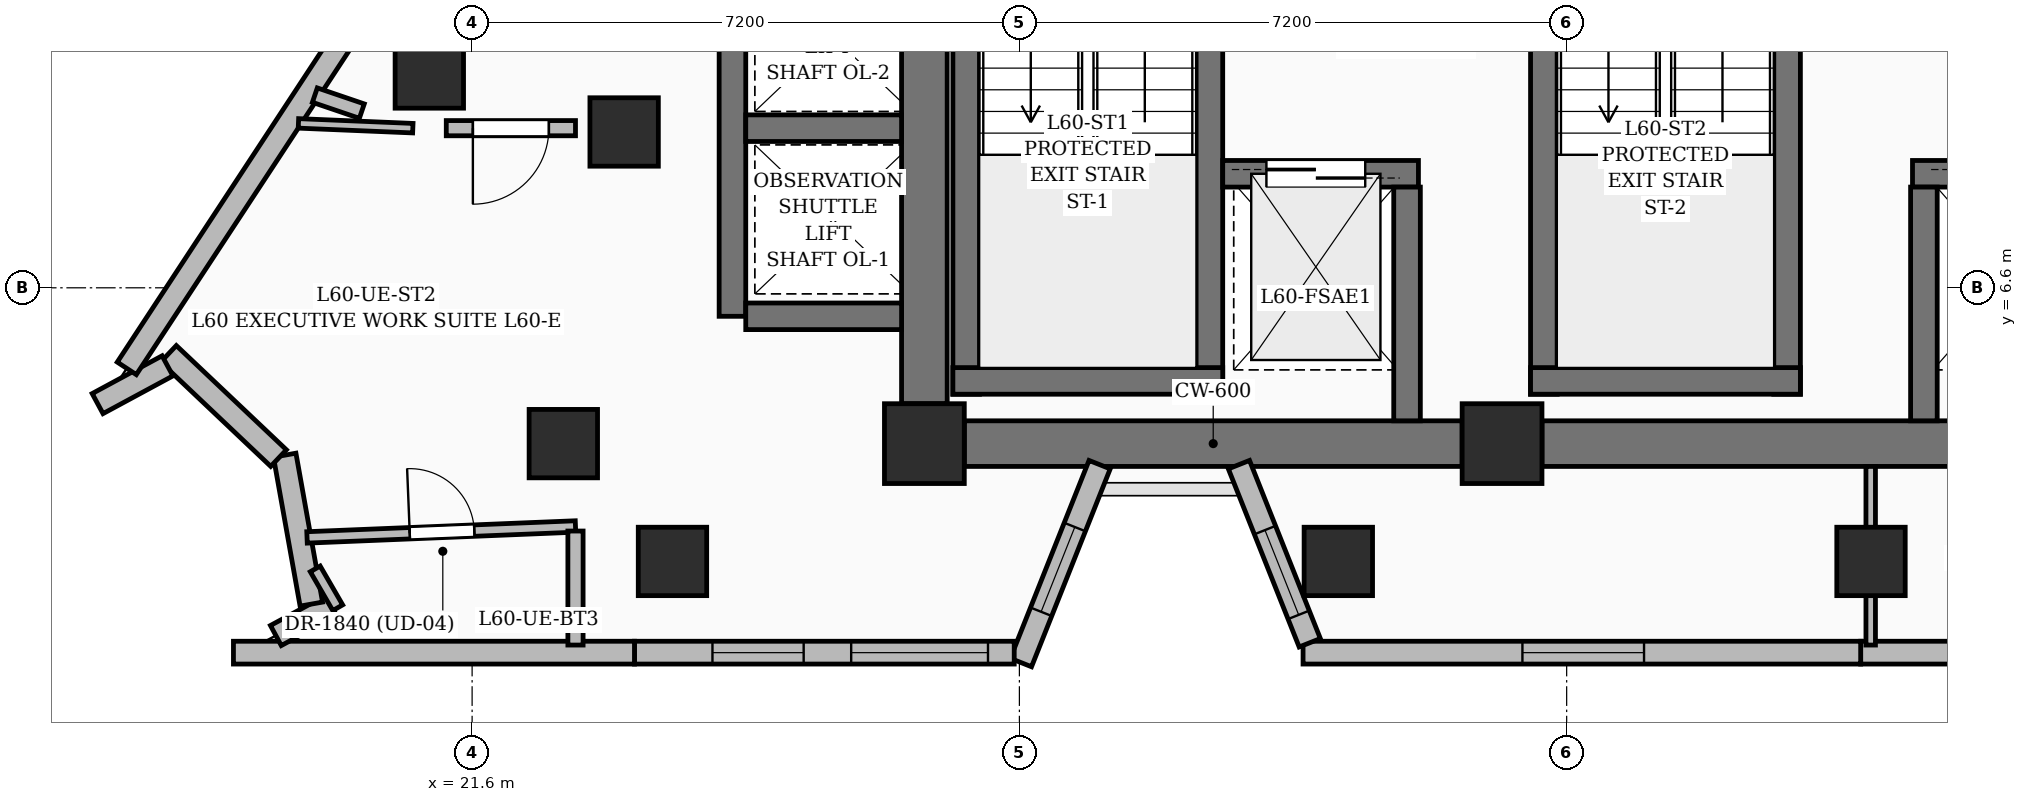
"""IFC4 building model, lengths in metres.
Left out: names, types, materials, properties, quantities, classifications, styles, units other than length and angle.
Written with IfcOpenShell. Run it as: python <this file> out.ifc"""

import sys

from ifc_helpers import new_model, si_unit, direction, frame, frame_2d, origin, origin_2d, place, context, subcontext, project, spatial, rectangle, extrude, element, fill, save


model = new_model("IFC4")
c1 = context("Model", 3, precision=1e-05, world=origin(), true_north=direction((0.0, 1.0)))
c2 = subcontext(c1, "Body", "Model", "MODEL_VIEW")
j1 = project(units=[si_unit("LENGTHUNIT", "METRE"), si_unit("PLANEANGLEUNIT", "RADIAN")], contexts=[c1])
p1 = place(None, origin())
s1 = spatial("IfcSite", under=j1, at=p1, CompositionType="ELEMENT")
p2 = place(p1, origin())
s2 = spatial("IfcBuilding", under=s1, at=p2, CompositionType="ELEMENT")
p3 = place(p2, frame((0.0, 0.0, 233.25)))
s3 = spatial("IfcBuildingStorey", under=s2, at=p3, CompositionType="ELEMENT", Elevation=233.25)
for number, where, z_axis, x_axis in (
    (1, (27.55, 4.55, 0.0), (0.0, 0.0, 1.0), (1.0, 0.0, 0.0)),
    (2, (35.15, 4.55, 0.0), (0.0, 0.0, 1.0), (1.0, 0.0, 0.0)),
):
    element("IfcColumn", number, at=place(p3, frame(where, z_axis=z_axis, x_axis=x_axis)), inside=s3, PredefinedType="COLUMN", context=c2, shape_type="SweptSolid", body=[
        extrude(rectangle(XDim=1.05, YDim=1.05, at=origin_2d()), origin(), (0.0, 0.0, 1.0), 3.75),
    ])
for number, where, z_axis, x_axis in (
    (3, (22.8, 4.55, 0.0), (0.0, 0.0, 1.0), (1.0, 0.0, 0.0)),
    (4, (23.6, 8.65, 0.0), (0.0, 0.0, 1.0), (1.0, 0.0, 0.0)),
):
    element("IfcColumn", number, at=place(p3, frame(where, z_axis=z_axis, x_axis=x_axis)), inside=s3, PredefinedType="COLUMN", context=c2, shape_type="SweptSolid", body=[
        extrude(rectangle(XDim=0.9, YDim=0.9, at=origin_2d()), origin(), (0.0, 0.0, 1.0), 3.75),
    ])
p4 = place(p3, frame((28.075, 4.55, 0.0), z_axis=(0.0, 0.0, 1.0), x_axis=(1.0, 0.0, 0.0)))
e5 = element("IfcWall", 5, at=p4, inside=s3, PredefinedType="SHEAR", context=c2, shape_type="SweptSolid", body=[
    extrude(rectangle(XDim=6.55, YDim=0.6, at=frame_2d((3.275, 0.0))), origin(), (0.0, 0.0, 1.0), 3.75),
])
p5 = place(p3, frame((35.675, 4.55, 0.0), z_axis=(0.0, 0.0, 1.0), x_axis=(1.0, 0.0, 0.0)))
e6 = element("IfcWall", 6, at=p5, inside=s3, PredefinedType="SHEAR", context=c2, shape_type="SweptSolid", body=[
    extrude(rectangle(XDim=10.85, YDim=0.6, at=frame_2d((5.425, 0.0))), origin(), (0.0, 0.0, 1.0), 3.75),
])
p6 = place(p3, frame((27.55, 5.075, 0.0), z_axis=(0.0, 0.0, 1.0), x_axis=(0.0, 1.0, 0.0)))
e7 = element("IfcWall", 7, at=p6, inside=s3, PredefinedType="SHEAR", context=c2, shape_type="SweptSolid", body=[
    extrude(rectangle(XDim=9.15, YDim=0.6, at=frame_2d((4.575, 0.0))), origin(), (0.0, 0.0, 1.0), 3.75),
])
p7 = place(p3, frame((28.1, 5.2, 0.0), z_axis=(0.0, 0.0, 1.0), x_axis=(0.0, 1.0, 0.0)))
e8 = element("IfcWall", 8, at=p7, inside=s3, PredefinedType="SOLIDWALL", context=c2, shape_type="SweptSolid", body=[
    extrude(rectangle(XDim=9.25, YDim=0.35, at=frame_2d((4.625, 0.0))), origin(), (0.0, 0.0, 1.0), 3.75),
])
p8 = place(p3, frame((31.3, 5.2, 0.0), z_axis=(0.0, 0.0, 1.0), x_axis=(0.0, 1.0, 0.0)))
e9 = element("IfcWall", 9, at=p8, inside=s3, PredefinedType="SOLIDWALL", context=c2, shape_type="SweptSolid", body=[
    extrude(rectangle(XDim=9.25, YDim=0.35, at=frame_2d((4.625, 0.0))), origin(), (0.0, 0.0, 1.0), 3.75),
])
p9 = place(p8, frame((6.02, 0.0, 0.0)))
e10 = element("IfcOpeningElement", 10, at=p9, cuts=e9, PredefinedType="OPENING", context=c2, shape_type="SweptSolid", body=[
    extrude(rectangle(XDim=1.0, YDim=2.15, at=frame_2d((0.5, 1.075))), frame((0.0, 0.185, 0.0), z_axis=(0.0, -1.0, 0.0), x_axis=(1.0, 0.0, 0.0)), (0.0, 0.0, 1.0), 0.37),
])
p10 = place(p3, frame((27.925, 5.375, 0.0), z_axis=(0.0, 0.0, 1.0), x_axis=(1.0, 0.0, 0.0)))
e11 = element("IfcWall", 11, at=p10, inside=s3, PredefinedType="SOLIDWALL", context=c2, shape_type="SweptSolid", body=[
    extrude(rectangle(XDim=3.55, YDim=0.35, at=frame_2d((1.775, 0.0))), origin(), (0.0, 0.0, 1.0), 3.75),
])
p11 = place(p3, frame((35.7, 5.2, 0.0), z_axis=(0.0, 0.0, 1.0), x_axis=(0.0, 1.0, 0.0)))
e12 = element("IfcWall", 12, at=p11, inside=s3, PredefinedType="SOLIDWALL", context=c2, shape_type="SweptSolid", body=[
    extrude(rectangle(XDim=9.25, YDim=0.35, at=frame_2d((4.625, 0.0))), origin(), (0.0, 0.0, 1.0), 3.75),
])
p12 = place(p11, frame((6.02, 0.0, 0.0)))
e13 = element("IfcOpeningElement", 13, at=p12, cuts=e12, PredefinedType="OPENING", context=c2, shape_type="SweptSolid", body=[
    extrude(rectangle(XDim=1.0, YDim=2.15, at=frame_2d((0.5, 1.075))), frame((0.0, 0.185, 0.0), z_axis=(0.0, -1.0, 0.0), x_axis=(1.0, 0.0, 0.0)), (0.0, 0.0, 1.0), 0.37),
])
p13 = place(p3, frame((38.9, 5.2, 0.0), z_axis=(0.0, 0.0, 1.0), x_axis=(0.0, 1.0, 0.0)))
e14 = element("IfcWall", 14, at=p13, inside=s3, PredefinedType="SOLIDWALL", context=c2, shape_type="SweptSolid", body=[
    extrude(rectangle(XDim=9.25, YDim=0.35, at=frame_2d((4.625, 0.0))), origin(), (0.0, 0.0, 1.0), 3.75),
])
p14 = place(p13, frame((6.02, 0.0, 0.0)))
e15 = element("IfcOpeningElement", 15, at=p14, cuts=e14, PredefinedType="OPENING", context=c2, shape_type="SweptSolid", body=[
    extrude(rectangle(XDim=1.0, YDim=2.15, at=frame_2d((0.5, 1.075))), frame((0.0, 0.185, 0.0), z_axis=(0.0, -1.0, 0.0), x_axis=(1.0, 0.0, 0.0)), (0.0, 0.0, 1.0), 0.37),
])
p15 = place(p3, frame((35.525, 5.375, 0.0), z_axis=(0.0, 0.0, 1.0), x_axis=(1.0, 0.0, 0.0)))
e16 = element("IfcWall", 16, at=p15, inside=s3, PredefinedType="SOLIDWALL", context=c2, shape_type="SweptSolid", body=[
    extrude(rectangle(XDim=3.55, YDim=0.35, at=frame_2d((1.775, 0.0))), origin(), (0.0, 0.0, 1.0), 3.75),
])
p16 = place(p3, frame((31.475, 8.1, 0.0), z_axis=(0.0, 0.0, 1.0), x_axis=(1.0, 0.0, 0.0)))
e17 = element("IfcWall", 17, at=p16, inside=s3, PredefinedType="SOLIDWALL", context=c2, shape_type="SweptSolid", body=[
    extrude(rectangle(XDim=2.575, YDim=0.35, at=frame_2d((1.288, 0.0))), origin(), (0.0, 0.0, 1.0), 3.75),
])
p17 = place(p16, frame((0.575, 0.0, 0.0)))
e18 = element("IfcOpeningElement", 18, at=p17, cuts=e17, PredefinedType="OPENING", context=c2, shape_type="SweptSolid", body=[
    extrude(rectangle(XDim=1.3, YDim=2.25, at=frame_2d((0.65, 1.125))), frame((0.0, 0.185, 0.0), z_axis=(0.0, -1.0, 0.0), x_axis=(1.0, 0.0, 0.0)), (0.0, 0.0, 1.0), 0.37),
])
p18 = place(p3, frame((40.55, 8.1, 0.0), z_axis=(0.0, 0.0, 1.0), x_axis=(1.0, 0.0, 0.0)))
e19 = element("IfcWall", 19, at=p18, inside=s3, PredefinedType="SOLIDWALL", context=c2, shape_type="SweptSolid", body=[
    extrude(rectangle(XDim=2.575, YDim=0.35, at=frame_2d((1.288, 0.0))), origin(), (0.0, 0.0, 1.0), 3.75),
])
p19 = place(p18, frame((0.7, 0.0, 0.0)))
e20 = element("IfcOpeningElement", 20, at=p19, cuts=e19, PredefinedType="OPENING", context=c2, shape_type="SweptSolid", body=[
    extrude(rectangle(XDim=1.3, YDim=2.25, at=frame_2d((0.65, 1.125))), frame((0.0, 0.185, 0.0), z_axis=(0.0, -1.0, 0.0), x_axis=(1.0, 0.0, 0.0)), (0.0, 0.0, 1.0), 0.37),
])
for number, where, z_axis, x_axis in (
    (21, (33.9, 4.85, 0.0), (0.0, 0.0, 1.0), (0.0, 1.0, 0.0)),
    (22, (40.7, 4.85, 0.0), (0.0, 0.0, 1.0), (0.0, 1.0, 0.0)),
):
    element("IfcWall", number, at=place(p3, frame(where, z_axis=z_axis, x_axis=x_axis)), inside=s3, PredefinedType="SOLIDWALL", context=c2, shape_type="SweptSolid", body=[
        extrude(rectangle(XDim=3.075, YDim=0.35, at=frame_2d((1.538, 0.0))), origin(), (0.0, 0.0, 1.0), 3.75),
    ])
p20 = place(p3, frame((25.025, 6.225, 0.0), z_axis=(0.0, 0.0, 1.0), x_axis=(0.0, 1.0, 0.0)))
e23 = element("IfcWall", 23, at=p20, inside=s3, PredefinedType="SOLIDWALL", context=c2, shape_type="SweptSolid", body=[
    extrude(rectangle(XDim=4.95, YDim=0.35, at=frame_2d((2.475, 0.0))), origin(), (0.0, 0.0, 1.0), 3.75),
])
for number, where, z_axis, x_axis in (
    (24, (25.2, 6.225, 0.0), (0.0, 0.0, 1.0), (1.0, 0.0, 0.0)),
    (25, (25.2, 8.7, 0.0), (0.0, 0.0, 1.0), (1.0, 0.0, 0.0)),
):
    element("IfcWall", number, at=place(p3, frame(where, z_axis=z_axis, x_axis=x_axis)), inside=s3, PredefinedType="SOLIDWALL", context=c2, shape_type="SweptSolid", body=[
        extrude(rectangle(XDim=2.05, YDim=0.35, at=frame_2d((1.025, 0.0))), origin(), (0.0, 0.0, 1.0), 3.75),
    ])
for number, where, z_axis, x_axis in (
    (26, (24.236, 3.0, 0.0), (0.0, 0.0, 1.0), (1.0, 0.0, 0.0)),
    (27, (32.996, 3.0, 0.0), (0.0, 0.0, 1.0), (1.0, 0.0, 0.0)),
    (28, (40.004, 3.0, 0.0), (0.0, 0.0, 1.0), (1.0, 0.0, 0.0)),
    (29, (21.037, 9.413, 0.0), (0.0, 0.0, 1.0), (1.0, 0.0, 0.0)),
):
    element("IfcColumn", number, at=place(p3, frame(where, z_axis=z_axis, x_axis=x_axis)), inside=s3, PredefinedType="COLUMN", context=c2, shape_type="SweptSolid", body=[
        extrude(rectangle(XDim=0.9, YDim=0.9, at=origin_2d()), origin(), (0.0, 0.0, 1.0), 3.75),
    ])
p21 = place(p3, frame((47.204, 1.8, 0.0), z_axis=(0.0, 0.0, 1.0), x_axis=(-1.0, 0.0, 0.0)))
e30 = element("IfcWall", 30, at=p21, inside=s3, PredefinedType="SOLIDWALL", context=c2, shape_type="SweptSolid", body=[
    extrude(rectangle(XDim=7.336, YDim=0.3, at=frame_2d((3.668, 0.0))), origin(), (0.0, 0.0, 1.0), 3.5),
])
p22 = place(p21, frame((2.875, 0.0, 0.6)))
e31 = element("IfcOpeningElement", 31, at=p22, cuts=e30, PredefinedType="OPENING", context=c2, shape_type="SweptSolid", body=[
    extrude(rectangle(XDim=1.8, YDim=2.1, at=frame_2d((0.9, 1.05))), frame((0.0, 0.16, 0.0), z_axis=(0.0, -1.0, 0.0), x_axis=(1.0, 0.0, 0.0)), (0.0, 0.0, 1.0), 0.32),
])
p23 = place(p3, frame((39.868, 1.8, 0.0), z_axis=(0.0, 0.0, 1.0), x_axis=(-1.0, 0.0, 0.0)))
e32 = element("IfcWall", 32, at=p23, inside=s3, PredefinedType="SOLIDWALL", context=c2, shape_type="SweptSolid", body=[
    extrude(rectangle(XDim=7.336, YDim=0.3, at=frame_2d((3.668, 0.0))), origin(), (0.0, 0.0, 1.0), 3.5),
])
p24 = place(p23, frame((2.85, 0.0, 0.55)))
e33 = element("IfcOpeningElement", 33, at=p24, cuts=e32, PredefinedType="OPENING", context=c2, shape_type="SweptSolid", body=[
    extrude(rectangle(XDim=1.6, YDim=2.2, at=frame_2d((0.8, 1.1))), frame((0.0, 0.16, 0.0), z_axis=(0.0, -1.0, 0.0), x_axis=(1.0, 0.0, 0.0)), (0.0, 0.0, 1.0), 0.32),
])
p25 = place(p3, frame((32.62, 1.93, 0.0), z_axis=(0.0, 0.0, 1.0), x_axis=(-0.369453529453, 0.929249207465, 0.0)))
e34 = element("IfcWall", 34, at=p25, inside=s3, PredefinedType="SOLIDWALL", context=c2, shape_type="SweptSolid", body=[
    extrude(rectangle(XDim=2.522, YDim=0.3, at=frame_2d((1.261, 0.0))), origin(), (0.0, 0.0, 1.0), 2.825),
])
p26 = place(p25, frame((0.395, 0.0, 0.8)))
e35 = element("IfcOpeningElement", 35, at=p26, cuts=e34, PredefinedType="OPENING", context=c2, shape_type="SweptSolid", body=[
    extrude(rectangle(XDim=1.2, YDim=1.8, at=frame_2d((0.6, 0.9))), frame((0.0, 0.16, 0.0), z_axis=(0.0, -1.0, 0.0), x_axis=(1.0, 0.0, 0.0)), (0.0, 0.0, 1.0), 0.32),
])
p27 = place(p3, frame((29.856, 4.273, 0.0), z_axis=(0.0, 0.0, 1.0), x_axis=(-0.369542065233, -0.929214002275, 0.0)))
e36 = element("IfcWall", 36, at=p27, inside=s3, PredefinedType="SOLIDWALL", context=c2, shape_type="SweptSolid", body=[
    extrude(rectangle(XDim=2.802, YDim=0.3, at=frame_2d((1.401, 0.0))), origin(), (0.0, 0.0, 1.0), 2.825),
])
p28 = place(p27, frame((0.883, 0.0, 0.8)))
e37 = element("IfcOpeningElement", 37, at=p28, cuts=e36, PredefinedType="OPENING", context=c2, shape_type="SweptSolid", body=[
    extrude(rectangle(XDim=1.2, YDim=1.8, at=frame_2d((0.6, 0.9))), frame((0.0, 0.16, 0.0), z_axis=(0.0, -1.0, 0.0), x_axis=(1.0, 0.0, 0.0)), (0.0, 0.0, 1.0), 0.32),
])
p29 = place(p3, frame((28.732, 1.8, 0.0), z_axis=(0.0, 0.0, 1.0), x_axis=(-1.0, 0.0, 0.0)))
e38 = element("IfcWall", 38, at=p29, inside=s3, PredefinedType="SOLIDWALL", context=c2, shape_type="SweptSolid", body=[
    extrude(rectangle(XDim=4.996, YDim=0.3, at=frame_2d((2.498, 0.0))), origin(), (0.0, 0.0, 1.0), 3.5),
])
p30 = place(p29, frame((0.345, 0.0, 0.6)))
e39 = element("IfcOpeningElement", 39, at=p30, cuts=e38, PredefinedType="OPENING", context=c2, shape_type="SweptSolid", body=[
    extrude(rectangle(XDim=1.8, YDim=2.1, at=frame_2d((0.9, 1.05))), frame((0.0, 0.16, 0.0), z_axis=(0.0, -1.0, 0.0), x_axis=(1.0, 0.0, 0.0)), (0.0, 0.0, 1.0), 0.32),
])
p31 = place(p29, frame((2.77, 0.0, 0.8)))
e40 = element("IfcOpeningElement", 40, at=p31, cuts=e38, PredefinedType="OPENING", context=c2, shape_type="SweptSolid", body=[
    extrude(rectangle(XDim=1.2, YDim=1.8, at=frame_2d((0.6, 0.9))), frame((0.0, 0.16, 0.0), z_axis=(0.0, -1.0, 0.0), x_axis=(1.0, 0.0, 0.0)), (0.0, 0.0, 1.0), 0.32),
])
p32 = place(p3, frame((23.736, 1.8, 0.0), z_axis=(0.0, 0.0, 1.0), x_axis=(-1.0, 0.0, 0.0)))
e41 = element("IfcWall", 41, at=p32, inside=s3, PredefinedType="SOLIDWALL", context=c2, shape_type="SweptSolid", body=[
    extrude(rectangle(XDim=5.276, YDim=0.3, at=frame_2d((2.638, 0.0))), origin(), (0.0, 0.0, 1.0), 3.5),
])
p33 = place(p3, frame((19.018, 2.025, 0.0), z_axis=(0.0, 0.0, 1.0), x_axis=(0.880196276444, 0.474609855496, 0.0)))
e42 = element("IfcWall", 42, at=p33, inside=s3, PredefinedType="SOLIDWALL", context=c2, shape_type="SweptSolid", body=[
    extrude(rectangle(XDim=0.828, YDim=0.3, at=frame_2d((0.414, 0.0))), origin(), (0.0, 0.0, 1.0), 3.5),
])
p34 = place(p3, frame((19.485, 2.439, 0.0), z_axis=(0.0, 0.0, 1.0), x_axis=(-0.175926512458, 0.984403302623, 0.0)))
e43 = element("IfcWall", 43, at=p34, inside=s3, PredefinedType="SOLIDWALL", context=c2, shape_type="SweptSolid", body=[
    extrude(rectangle(XDim=1.99, YDim=0.3, at=frame_2d((0.995, 0.0))), origin(), (0.0, 0.0, 1.0), 3.5),
])
p35 = place(p3, frame((19.054, 4.36, 0.0), z_axis=(0.0, 0.0, 1.0), x_axis=(-0.726119894398, 0.68756810496, 0.0)))
e44 = element("IfcWall", 44, at=p35, inside=s3, PredefinedType="SOLIDWALL", context=c2, shape_type="SweptSolid", body=[
    extrude(rectangle(XDim=1.995, YDim=0.3, at=frame_2d((0.998, 0.0))), origin(), (0.0, 0.0, 1.0), 3.5),
])
p36 = place(p3, frame((17.593, 5.573, 0.0), z_axis=(0.0, 0.0, 1.0), x_axis=(-0.879825313212, -0.475297189378, 0.0)))
e45 = element("IfcWall", 45, at=p36, inside=s3, PredefinedType="SOLIDWALL", context=c2, shape_type="SweptSolid", body=[
    extrude(rectangle(XDim=1.045, YDim=0.3, at=frame_2d((0.523, 0.0))), origin(), (0.0, 0.0, 1.0), 3.5),
])
p37 = place(p3, frame((17.057, 5.54, 0.0), z_axis=(0.0, 0.0, 1.0), x_axis=(0.549039031033, 0.83579671117, 0.0)))
e46 = element("IfcWall", 46, at=p37, inside=s3, PredefinedType="SOLIDWALL", context=c2, shape_type="SweptSolid", body=[
    extrude(rectangle(XDim=6.982, YDim=0.3, at=frame_2d((3.491, 0.0))), origin(), (0.0, 0.0, 1.0), 3.5),
])
p38 = place(p3, frame((19.428, 3.316, 0.0), z_axis=(0.0, 0.0, 1.0), x_axis=(0.999169430966, 0.040748597793, 0.0)))
e47 = element("IfcWall", 47, at=p38, inside=s3, PredefinedType="PARTITIONING", context=c2, shape_type="SweptSolid", body=[
    extrude(rectangle(XDim=3.535, YDim=0.15, at=frame_2d((1.768, 0.0))), origin(), (0.0, 0.0, 1.0), 3.5),
])
p39 = place(p38, frame((1.353, 0.0, 0.0)))
e48 = element("IfcOpeningElement", 48, at=p39, cuts=e47, PredefinedType="OPENING", context=c2, shape_type="SweptSolid", body=[
    extrude(rectangle(XDim=0.85, YDim=2.1, at=frame_2d((0.425, 1.05))), frame((0.0, 0.085, 0.0), z_axis=(0.0, -1.0, 0.0), x_axis=(1.0, 0.0, 0.0)), (0.0, 0.0, 1.0), 0.17),
])
p40 = place(p3, frame((20.149, 8.925, 0.0), z_axis=(0.0, 0.0, 1.0), x_axis=(-0.946606200233, 0.322392155117, 0.0)))
e49 = element("IfcWall", 49, at=p40, inside=s3, PredefinedType="PARTITIONING", context=c2, shape_type="SweptSolid", body=[
    extrude(rectangle(XDim=0.653, YDim=0.2, at=frame_2d((0.326, 0.0))), origin(), (0.0, 0.0, 1.0), 3.5),
])
p41 = place(p3, frame((22.96, 8.7, 0.0), z_axis=(0.0, 0.0, 1.0), x_axis=(-1.0, 0.0, 0.0)))
e50 = element("IfcWall", 50, at=p41, inside=s3, PredefinedType="PARTITIONING", context=c2, shape_type="SweptSolid", body=[
    extrude(rectangle(XDim=1.7, YDim=0.2, at=frame_2d((0.85, 0.0))), origin(), (0.0, 0.0, 1.0), 2.685),
])
p42 = place(p41, frame((0.35, 0.0, 0.0)))
e51 = element("IfcOpeningElement", 51, at=p42, cuts=e50, PredefinedType="OPENING", context=c2, shape_type="SweptSolid", body=[
    extrude(rectangle(XDim=1.0, YDim=2.2, at=frame_2d((0.5, 1.1))), frame((0.0, 0.11, 0.0), z_axis=(0.0, -1.0, 0.0), x_axis=(1.0, 0.0, 0.0)), (0.0, 0.0, 1.0), 0.22),
])
p43 = place(p3, frame((22.96, 1.9, 0.0), z_axis=(0.0, 0.0, 1.0), x_axis=(0.0, 1.0, 0.0)))
e52 = element("IfcWall", 52, at=p43, inside=s3, PredefinedType="PARTITIONING", context=c2, shape_type="SweptSolid", body=[
    extrude(rectangle(XDim=1.5, YDim=0.2, at=frame_2d((0.75, 0.0))), origin(), (0.0, 0.0, 1.0), 3.5),
])
p44 = place(p3, frame((40.0, 1.9, 0.0), z_axis=(0.0, 0.0, 1.0), x_axis=(0.0, 1.0, 0.0)))
e53 = element("IfcWall", 53, at=p44, inside=s3, PredefinedType="PARTITIONING", context=c2, shape_type="SweptSolid", body=[
    extrude(rectangle(XDim=2.35, YDim=0.125, at=frame_2d((1.175, 0.0))), origin(), (0.0, 0.0, 1.0), 3.5),
])
p45 = place(p3, frame((20.82, 8.7, 0.0), z_axis=(0.0, 0.0, 1.0), x_axis=(-0.999125472924, 0.041812550205, 0.0)))
e54 = element("IfcWall", 54, at=p45, inside=s3, PredefinedType="PARTITIONING", context=c2, shape_type="SweptSolid", body=[
    extrude(rectangle(XDim=1.506, YDim=0.125, at=frame_2d((0.753, 0.0))), origin(), (0.0, 0.0, 1.0), 3.5),
])
p46 = place(p3, frame((19.536, 2.902, 0.0), z_axis=(0.0, 0.0, 1.0), x_axis=(0.501427298818, -0.865199782709, 0.0)))
e55 = element("IfcWall", 55, at=p46, inside=s3, PredefinedType="PARTITIONING", context=c2, shape_type="SweptSolid", body=[
    extrude(rectangle(XDim=0.591, YDim=0.15, at=frame_2d((0.295, 0.0))), origin(), (0.0, 0.0, 1.0), 3.5),
])
p47 = place(p24, origin())
e56 = element("IfcWindow", 56, at=p47, inside=s3, PartitioningType="SINGLE_PANEL", PredefinedType="WINDOW", context=c2, shape_type="SweptSolid", body=[
    extrude(rectangle(XDim=1.6, YDim=2.2, at=frame_2d((0.8, 1.1))), frame((0.0, 0.03, 0.0), z_axis=(0.0, -1.0, 0.0), x_axis=(1.0, 0.0, 0.0)), (0.0, 0.0, 1.0), 0.06),
])
fill(e33, e56)
p48 = place(p26, origin())
e57 = element("IfcWindow", 57, at=p48, inside=s3, PartitioningType="SINGLE_PANEL", PredefinedType="WINDOW", context=c2, shape_type="SweptSolid", body=[
    extrude(rectangle(XDim=1.2, YDim=1.8, at=frame_2d((0.6, 0.9))), frame((0.0, 0.03, 0.0), z_axis=(0.0, -1.0, 0.0), x_axis=(1.0, 0.0, 0.0)), (0.0, 0.0, 1.0), 0.06),
])
fill(e35, e57)
p49 = place(p28, origin())
e58 = element("IfcWindow", 58, at=p49, inside=s3, PartitioningType="SINGLE_PANEL", PredefinedType="WINDOW", context=c2, shape_type="SweptSolid", body=[
    extrude(rectangle(XDim=1.2, YDim=1.8, at=frame_2d((0.6, 0.9))), frame((0.0, 0.03, 0.0), z_axis=(0.0, -1.0, 0.0), x_axis=(1.0, 0.0, 0.0)), (0.0, 0.0, 1.0), 0.06),
])
fill(e37, e58)
p50 = place(p30, origin())
e59 = element("IfcWindow", 59, at=p50, inside=s3, PartitioningType="SINGLE_PANEL", PredefinedType="WINDOW", context=c2, shape_type="SweptSolid", body=[
    extrude(rectangle(XDim=1.8, YDim=2.1, at=frame_2d((0.9, 1.05))), frame((0.0, 0.03, 0.0), z_axis=(0.0, -1.0, 0.0), x_axis=(1.0, 0.0, 0.0)), (0.0, 0.0, 1.0), 0.06),
])
fill(e39, e59)
p51 = place(p31, origin())
e60 = element("IfcWindow", 60, at=p51, inside=s3, PartitioningType="SINGLE_PANEL", PredefinedType="WINDOW", context=c2, shape_type="SweptSolid", body=[
    extrude(rectangle(XDim=1.2, YDim=1.8, at=frame_2d((0.6, 0.9))), frame((0.0, 0.03, 0.0), z_axis=(0.0, -1.0, 0.0), x_axis=(1.0, 0.0, 0.0)), (0.0, 0.0, 1.0), 0.06),
])
fill(e40, e60)
p52 = place(p17, origin())
e61 = element("IfcDoor", 61, at=p52, inside=s3, OperationType="DOUBLE_DOOR_SLIDING", PredefinedType="DOOR", context=c2, shape_type="SweptSolid", body=[
    extrude(rectangle(XDim=1.3, YDim=2.25, at=frame_2d((0.65, 1.125))), frame((0.0, 0.025, 0.0), z_axis=(0.0, -1.0, 0.0), x_axis=(1.0, 0.0, 0.0)), (0.0, 0.0, 1.0), 0.05),
])
fill(e18, e61)
p53 = place(p39, origin())
e62 = element("IfcDoor", 62, at=p53, inside=s3, OperationType="SINGLE_SWING_LEFT", PredefinedType="DOOR", context=c2, shape_type="SweptSolid", body=[
    extrude(rectangle(XDim=0.85, YDim=2.1, at=frame_2d((0.425, 1.05))), frame((0.0, 0.025, 0.0), z_axis=(0.0, -1.0, 0.0), x_axis=(1.0, 0.0, 0.0)), (0.0, 0.0, 1.0), 0.05),
])
fill(e48, e62)
p54 = place(p42, origin())
e63 = element("IfcDoor", 63, at=p54, inside=s3, OperationType="SINGLE_SWING_RIGHT", PredefinedType="DOOR", context=c2, shape_type="SweptSolid", body=[
    extrude(rectangle(XDim=1.0, YDim=2.2, at=frame_2d((0.5, 1.1))), frame((0.0, 0.025, 0.0), z_axis=(0.0, -1.0, 0.0), x_axis=(1.0, 0.0, 0.0)), (0.0, 0.0, 1.0), 0.05),
])
fill(e51, e63)
save(model, sys.argv[1])
